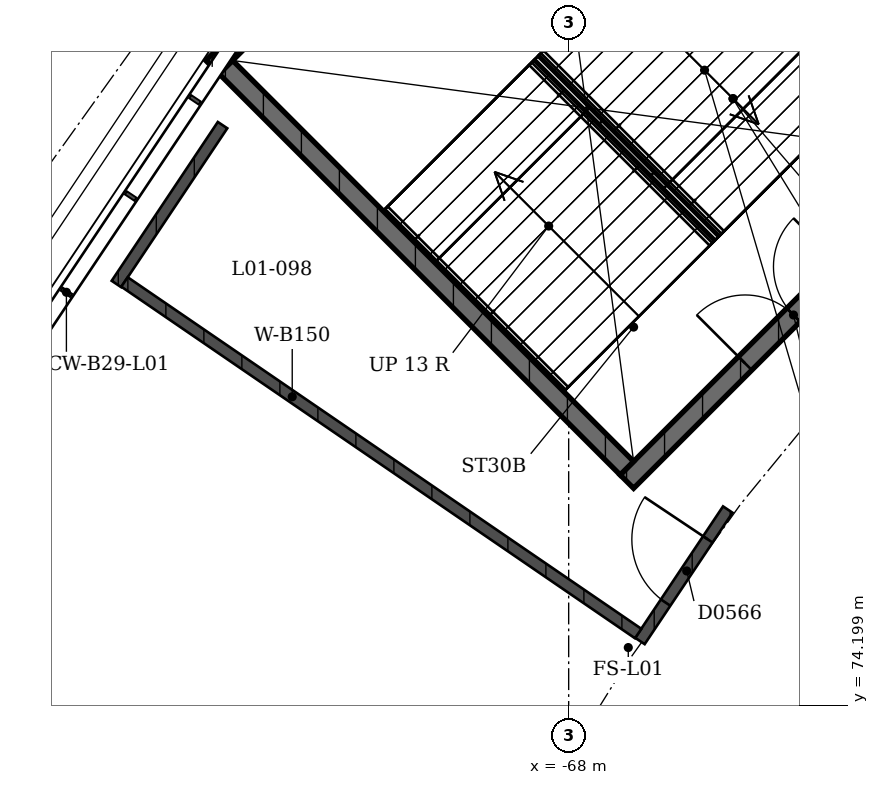
"""IFC4 building model, lengths in metres.
Left out: names, types, materials, properties, quantities, classifications, styles, units other than length and angle.
Written with IfcOpenShell. Run it as: python <this file> out.ifc"""

import sys

from ifc_helpers import new_model, si_unit, direction, frame, frame_2d, origin, place, context, subcontext, project, spatial, rectangle, extrude, element, fill, save


model = new_model("IFC4")
c1 = context("Model", 3, precision=1e-05, world=origin(), true_north=direction((0.0, 1.0)))
c2 = subcontext(c1, "Body", "Model", "MODEL_VIEW")
j1 = project(units=[si_unit("LENGTHUNIT", "METRE"), si_unit("PLANEANGLEUNIT", "RADIAN")], contexts=[c1])
p1 = place(None, origin())
s1 = spatial("IfcSite", under=j1, at=p1, CompositionType="ELEMENT")
p2 = place(p1, origin())
s2 = spatial("IfcBuilding", under=s1, at=p2, CompositionType="ELEMENT")
p3 = place(p2, frame((0.0, 0.0, 4.5)))
s3 = spatial("IfcBuildingStorey", under=s2, at=p3, CompositionType="ELEMENT", Elevation=4.5)
p4 = place(p3, frame((-58.643, 85.734, 0.0), z_axis=(0.0, 0.0, 1.0), x_axis=(-0.707106781187, -0.707106781187, 0.0)))
e1 = element("IfcWall", 1, at=p4, inside=s3, PredefinedType="SHEAR", context=c2, shape_type="SweptSolid", body=[
    extrude(rectangle(XDim=12.15, YDim=0.25, at=frame_2d((6.075, 0.0))), origin(), (0.0, 0.0, 1.0), 4.09),
])
p5 = place(p4, frame((2.2, 0.0, 0.0)))
e2 = element("IfcOpeningElement", 2, at=p5, cuts=e1, PredefinedType="OPENING", context=c2, shape_type="SweptSolid", body=[
    extrude(rectangle(XDim=1.8, YDim=2.1, at=frame_2d((0.9, 1.05))), frame((0.0, 0.125, 0.0), z_axis=(0.0, -1.0, 0.0), x_axis=(1.0, 0.0, 0.0)), (0.0, 0.0, 1.0), 0.25),
])
p6 = place(p4, frame((8.15, 0.0, 0.0)))
e3 = element("IfcOpeningElement", 3, at=p6, cuts=e1, PredefinedType="OPENING", context=c2, shape_type="SweptSolid", body=[
    extrude(rectangle(XDim=1.8, YDim=2.1, at=frame_2d((0.9, 1.05))), frame((0.0, 0.125, 0.0), z_axis=(0.0, -1.0, 0.0), x_axis=(1.0, 0.0, 0.0)), (0.0, 0.0, 1.0), 0.25),
])
p7 = place(p3, frame((-64.094, 91.186, 0.0), z_axis=(0.0, 0.0, 1.0), x_axis=(-0.707106781187, -0.707106781187, 0.0)))
e4 = element("IfcWall", 4, at=p7, inside=s3, PredefinedType="SHEAR", context=c2, shape_type="SweptSolid", body=[
    extrude(rectangle(XDim=12.15, YDim=0.25, at=frame_2d((6.075, 0.0))), origin(), (0.0, 0.0, 1.0), 4.09),
])
p8 = place(p3, frame((-67.234, 77.319, 0.0), z_axis=(0.0, 0.0, 1.0), x_axis=(-0.707090417709, 0.707123144286, 0.0)))
e5 = element("IfcWall", 5, at=p8, inside=s3, PredefinedType="SHEAR", context=c2, shape_type="SweptSolid", body=[
    extrude(rectangle(XDim=7.46, YDim=0.25, at=frame_2d((3.73, 0.0))), origin(), (0.0, 0.0, 1.0), 4.09),
])
p9 = place(p3, frame((-63.027, 81.527, 0.0), z_axis=(0.0, 0.0, 1.0), x_axis=(-0.707106781187, 0.707106781187, 0.0)))
e6 = element("IfcWall", 6, at=p9, inside=s3, PredefinedType="SHEAR", context=c2, shape_type="SweptSolid", body=[
    extrude(rectangle(XDim=7.46, YDim=0.25, at=frame_2d((3.73, 0.0))), origin(), (0.0, 0.0, 1.0), 4.09),
])
p10 = place(p3, frame((-65.907, 76.775, 0.0), z_axis=(0.0, 0.0, 1.0), x_axis=(-0.555485387307, -0.831526298134, 0.0)))
e7 = element("IfcWall", 7, at=p10, inside=s3, PredefinedType="SOLIDWALL", context=c2, shape_type="SweptSolid", body=[
    extrude(rectangle(XDim=2.08, YDim=0.15, at=frame_2d((1.04, 0.0))), origin(), (0.0, 0.0, 1.0), 3.0),
])
p11 = place(p10, frame((0.472, 0.0, 0.0)))
e8 = element("IfcOpeningElement", 8, at=p11, cuts=e7, PredefinedType="OPENING", context=c2, shape_type="SweptSolid", body=[
    extrude(rectangle(XDim=1.0, YDim=2.1, at=frame_2d((0.5, 1.05))), frame((0.0, 0.075, 0.0), z_axis=(0.0, -1.0, 0.0), x_axis=(1.0, 0.0, 0.0)), (0.0, 0.0, 1.0), 0.15),
])
p12 = place(p3, frame((-72.554, 81.833, 0.0), z_axis=(0.0, 0.0, 1.0), x_axis=(-0.555551611961, -0.831482054195, 0.0)))
e9 = element("IfcWall", 9, at=p12, inside=s3, PredefinedType="SOLIDWALL", context=c2, shape_type="SweptSolid", body=[
    extrude(rectangle(XDim=2.514, YDim=0.15, at=frame_2d((1.257, 0.0))), origin(), (0.0, 0.0, 1.0), 3.0),
])
p13 = place(p3, frame((-67.085, 75.144, 0.0), z_axis=(0.0, 0.0, 1.0), x_axis=(-0.825237791444, 0.564785434986, 0.0)))
e10 = element("IfcWall", 10, at=p13, inside=s3, PredefinedType="SOLIDWALL", context=c2, shape_type="SweptSolid", body=[
    extrude(rectangle(XDim=8.19, YDim=0.15, at=frame_2d((4.095, 0.0))), origin(), (0.0, 0.0, 1.0), 3.0),
])
p14 = place(p6, origin())
e11 = element("IfcDoor", 11, at=p14, inside=s3, OperationType="DOUBLE_DOOR_SINGLE_SWING", PredefinedType="DOOR", context=c2, shape_type="SweptSolid", body=[
    extrude(rectangle(XDim=1.8, YDim=2.1, at=frame_2d((0.9, 1.05))), frame((0.0, 0.025, 0.0), z_axis=(0.0, -1.0, 0.0), x_axis=(1.0, 0.0, 0.0)), (0.0, 0.0, 1.0), 0.05),
])
fill(e3, e11)
p15 = place(p11, origin())
e12 = element("IfcDoor", 12, at=p15, inside=s3, OperationType="SINGLE_SWING_LEFT", PredefinedType="DOOR", context=c2, shape_type="SweptSolid", body=[
    extrude(rectangle(XDim=1.0, YDim=2.1, at=frame_2d((0.5, 1.05))), frame((0.0, 0.025, 0.0), z_axis=(0.0, -1.0, 0.0), x_axis=(1.0, 0.0, 0.0)), (0.0, 0.0, 1.0), 0.05),
])
fill(e8, e12)
save(model, sys.argv[1])
